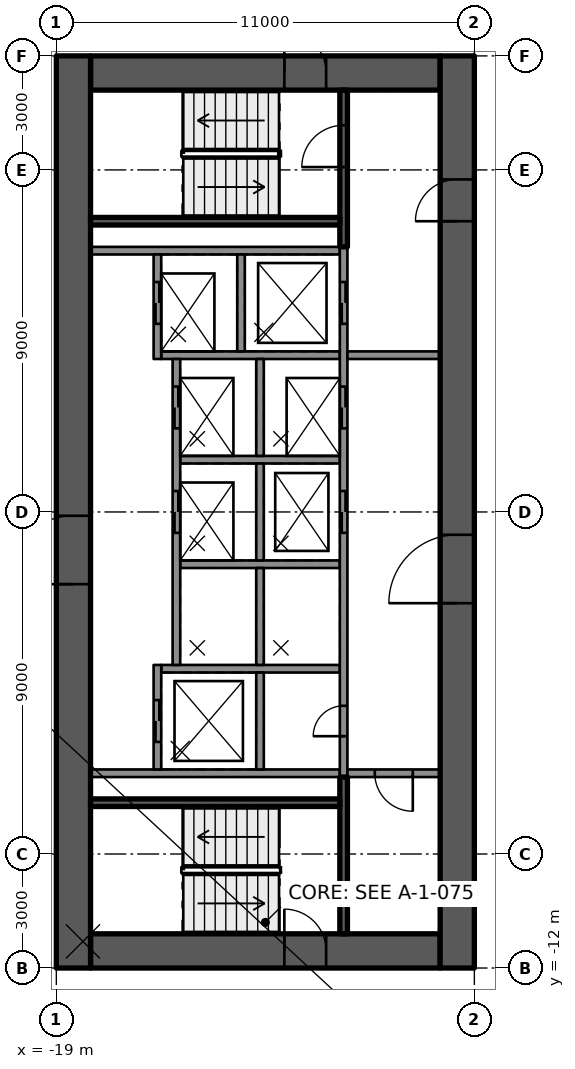
"""IFC4 building model, lengths in metres.
Left out: names, types, materials, properties, quantities, classifications, styles, units other than length and angle.
Written with IfcOpenShell. Run it as: python <this file> out.ifc"""

import sys

from ifc_helpers import new_model, si_unit, direction, frame, frame_2d, origin, place, context, subcontext, project, spatial, rectangle, extrude, element, fill, save


model = new_model("IFC4")
c1 = context("Model", 3, precision=1e-05, world=origin(), true_north=direction((0.0, 1.0)))
c2 = subcontext(c1, "Body", "Model", "MODEL_VIEW")
j1 = project(units=[si_unit("LENGTHUNIT", "METRE"), si_unit("PLANEANGLEUNIT", "RADIAN")], contexts=[c1])
p1 = place(None, origin())
s1 = spatial("IfcSite", under=j1, at=p1, CompositionType="ELEMENT")
p2 = place(p1, origin())
s2 = spatial("IfcBuilding", under=s1, at=p2, CompositionType="ELEMENT")
p3 = place(p2, frame((0.0, 0.0, 37.3)))
s3 = spatial("IfcBuildingStorey", under=s2, at=p3, CompositionType="ELEMENT", Elevation=37.3)
p4 = place(p3, frame((-18.1, 11.55, 0.0), z_axis=(0.0, 0.0, 1.0), x_axis=(1.0, 0.0, 0.0)))
e1 = element("IfcWall", 1, at=p4, inside=s3, PredefinedType="SHEAR", context=c2, shape_type="SweptSolid", body=[
    extrude(rectangle(XDim=9.2, YDim=0.9, at=frame_2d((4.6, 0.0))), origin(), (0.0, 0.0, 1.0), 3.5),
])
p5 = place(p4, frame((5.1, 0.0, 0.0)))
e2 = element("IfcOpeningElement", 2, at=p5, cuts=e1, PredefinedType="OPENING", context=c2, shape_type="SweptSolid", body=[
    extrude(rectangle(XDim=1.1, YDim=2.1, at=frame_2d((0.55, 1.05))), frame((0.0, 0.46, 0.0), z_axis=(0.0, -1.0, 0.0), x_axis=(1.0, 0.0, 0.0)), (0.0, 0.0, 1.0), 0.92),
])
p6 = place(p3, frame((-18.1, -11.55, 0.0), z_axis=(0.0, 0.0, 1.0), x_axis=(1.0, 0.0, 0.0)))
e3 = element("IfcWall", 3, at=p6, inside=s3, PredefinedType="SHEAR", context=c2, shape_type="SweptSolid", body=[
    extrude(rectangle(XDim=9.2, YDim=0.9, at=frame_2d((4.6, 0.0))), origin(), (0.0, 0.0, 1.0), 3.5),
])
p7 = place(p6, frame((5.1, 0.0, 0.0)))
e4 = element("IfcOpeningElement", 4, at=p7, cuts=e3, PredefinedType="OPENING", context=c2, shape_type="SweptSolid", body=[
    extrude(rectangle(XDim=1.1, YDim=2.1, at=frame_2d((0.55, 1.05))), frame((0.0, 0.46, 0.0), z_axis=(0.0, -1.0, 0.0), x_axis=(1.0, 0.0, 0.0)), (0.0, 0.0, 1.0), 0.92),
])
p8 = place(p3, frame((-18.55, -12.0, 0.0), z_axis=(0.0, 0.0, 1.0), x_axis=(0.0, 1.0, 0.0)))
e5 = element("IfcWall", 5, at=p8, inside=s3, PredefinedType="SHEAR", context=c2, shape_type="SweptSolid", body=[
    extrude(rectangle(XDim=24.0, YDim=0.9, at=frame_2d((12.0, 0.0))), origin(), (0.0, 0.0, 1.0), 3.5),
])
p9 = place(p8, frame((10.1, 0.0, 0.0)))
e6 = element("IfcOpeningElement", 6, at=p9, cuts=e5, PredefinedType="OPENING", context=c2, shape_type="SweptSolid", body=[
    extrude(rectangle(XDim=1.8, YDim=2.1, at=frame_2d((0.9, 1.05))), frame((0.0, 0.46, 0.0), z_axis=(0.0, -1.0, 0.0), x_axis=(1.0, 0.0, 0.0)), (0.0, 0.0, 1.0), 0.92),
])
p10 = place(p3, frame((-8.45, -12.0, 0.0), z_axis=(0.0, 0.0, 1.0), x_axis=(0.0, 1.0, 0.0)))
e7 = element("IfcWall", 7, at=p10, inside=s3, PredefinedType="SHEAR", context=c2, shape_type="SweptSolid", body=[
    extrude(rectangle(XDim=24.0, YDim=0.9, at=frame_2d((12.0, 0.0))), origin(), (0.0, 0.0, 1.0), 3.5),
])
p11 = place(p10, frame((9.6, 0.0, 0.0)))
e8 = element("IfcOpeningElement", 8, at=p11, cuts=e7, PredefinedType="OPENING", context=c2, shape_type="SweptSolid", body=[
    extrude(rectangle(XDim=1.8, YDim=2.1, at=frame_2d((0.9, 1.05))), frame((0.0, 0.46, 0.0), z_axis=(0.0, -1.0, 0.0), x_axis=(1.0, 0.0, 0.0)), (0.0, 0.0, 1.0), 0.92),
])
p12 = place(p10, frame((19.65, 0.0, 0.0)))
e9 = element("IfcOpeningElement", 9, at=p12, cuts=e7, PredefinedType="OPENING", context=c2, shape_type="SweptSolid", body=[
    extrude(rectangle(XDim=1.1, YDim=2.1, at=frame_2d((0.55, 1.05))), frame((0.0, 0.46, 0.0), z_axis=(0.0, -1.0, 0.0), x_axis=(1.0, 0.0, 0.0)), (0.0, 0.0, 1.0), 0.92),
])
for number, where, z_axis, x_axis in (
    (10, (-11.54, 6.875, 0.0), (0.0, 0.0, 1.0), (-1.0, 0.0, 0.0)),
    (11, (-11.54, -6.875, 0.0), (0.0, 0.0, 1.0), (-1.0, 0.0, 0.0)),
):
    element("IfcWall", number, at=place(p3, frame(where, z_axis=z_axis, x_axis=x_axis)), inside=s3, PredefinedType="SOLIDWALL", context=c2, shape_type="SweptSolid", body=[
        extrude(rectangle(XDim=6.56, YDim=0.2, at=frame_2d((3.28, 0.0))), origin(), (0.0, 0.0, 1.0), 3.08),
    ])
p13 = place(p3, frame((-11.54, -4.125, 0.0), z_axis=(0.0, 0.0, 1.0), x_axis=(-1.0, 0.0, 0.0)))
e12 = element("IfcWall", 12, at=p13, inside=s3, PredefinedType="SOLIDWALL", context=c2, shape_type="SweptSolid", body=[
    extrude(rectangle(XDim=4.7, YDim=0.2, at=frame_2d((2.35, 0.0))), origin(), (0.0, 0.0, 1.0), 3.08),
])
for number, where, z_axis, x_axis in (
    (13, (-11.54, -1.375, 0.0), (0.0, 0.0, 1.0), (-1.0, 0.0, 0.0)),
    (14, (-11.54, 1.375, 0.0), (0.0, 0.0, 1.0), (-1.0, 0.0, 0.0)),
):
    element("IfcWall", number, at=place(p3, frame(where, z_axis=z_axis, x_axis=x_axis)), inside=s3, PredefinedType="SOLIDWALL", context=c2, shape_type="SweptSolid", body=[
        extrude(rectangle(XDim=4.2, YDim=0.2, at=frame_2d((2.1, 0.0))), origin(), (0.0, 0.0, 1.0), 3.08),
    ])
p14 = place(p3, frame((-11.54, 4.125, 0.0), z_axis=(0.0, 0.0, 1.0), x_axis=(-1.0, 0.0, 0.0)))
e15 = element("IfcWall", 15, at=p14, inside=s3, PredefinedType="SOLIDWALL", context=c2, shape_type="SweptSolid", body=[
    extrude(rectangle(XDim=4.7, YDim=0.2, at=frame_2d((2.35, 0.0))), origin(), (0.0, 0.0, 1.0), 3.08),
])
p15 = place(p3, frame((-11.44, -6.975, 0.0), z_axis=(0.0, 0.0, 1.0), x_axis=(0.0, 1.0, 0.0)))
e16 = element("IfcWall", 16, at=p15, inside=s3, PredefinedType="SOLIDWALL", context=c2, shape_type="SweptSolid", body=[
    extrude(rectangle(XDim=13.95, YDim=0.2, at=frame_2d((6.975, 0.0))), origin(), (0.0, 0.0, 1.0), 3.08),
])
p16 = place(p15, frame((6.425, 0.0, 0.0)))
e17 = element("IfcOpeningElement", 17, at=p16, cuts=e16, PredefinedType="OPENING", context=c2, shape_type="SweptSolid", body=[
    extrude(rectangle(XDim=1.1, YDim=2.1, at=frame_2d((0.55, 1.05))), frame((0.0, 0.11, 0.0), z_axis=(0.0, -1.0, 0.0), x_axis=(1.0, 0.0, 0.0)), (0.0, 0.0, 1.0), 0.22),
])
p17 = place(p15, frame((9.175, 0.0, 0.0)))
e18 = element("IfcOpeningElement", 18, at=p17, cuts=e16, PredefinedType="OPENING", context=c2, shape_type="SweptSolid", body=[
    extrude(rectangle(XDim=1.1, YDim=2.1, at=frame_2d((0.55, 1.05))), frame((0.0, 0.11, 0.0), z_axis=(0.0, -1.0, 0.0), x_axis=(1.0, 0.0, 0.0)), (0.0, 0.0, 1.0), 0.22),
])
p18 = place(p15, frame((11.925, 0.0, 0.0)))
e19 = element("IfcOpeningElement", 19, at=p18, cuts=e16, PredefinedType="OPENING", context=c2, shape_type="SweptSolid", body=[
    extrude(rectangle(XDim=1.1, YDim=2.1, at=frame_2d((0.55, 1.05))), frame((0.0, 0.11, 0.0), z_axis=(0.0, -1.0, 0.0), x_axis=(1.0, 0.0, 0.0)), (0.0, 0.0, 1.0), 0.22),
])
p19 = place(p15, frame((1.075, 0.0, 0.0)))
e20 = element("IfcOpeningElement", 20, at=p19, cuts=e16, PredefinedType="OPENING", context=c2, shape_type="SweptSolid", body=[
    extrude(rectangle(XDim=0.8, YDim=2.1, at=frame_2d((0.4, 1.05))), frame((0.0, 0.11, 0.0), z_axis=(0.0, -1.0, 0.0), x_axis=(1.0, 0.0, 0.0)), (0.0, 0.0, 1.0), 0.22),
])
for number, where, z_axis, x_axis in (
    (21, (-13.64, -6.775, 0.0), (0.0, 0.0, 1.0), (0.0, 1.0, 0.0)),
    (22, (-13.64, -4.025, 0.0), (0.0, 0.0, 1.0), (0.0, 1.0, 0.0)),
    (23, (-13.64, -1.275, 0.0), (0.0, 0.0, 1.0), (0.0, 1.0, 0.0)),
    (24, (-13.64, 1.475, 0.0), (0.0, 0.0, 1.0), (0.0, 1.0, 0.0)),
    (25, (-14.14, 4.225, 0.0), (0.0, 0.0, 1.0), (0.0, 1.0, 0.0)),
):
    element("IfcWall", number, at=place(p3, frame(where, z_axis=z_axis, x_axis=x_axis)), inside=s3, PredefinedType="SOLIDWALL", context=c2, shape_type="SweptSolid", body=[
        extrude(rectangle(XDim=2.55, YDim=0.2, at=frame_2d((1.275, 0.0))), origin(), (0.0, 0.0, 1.0), 3.08),
    ])
p20 = place(p3, frame((-16.34, -6.775, 0.0), z_axis=(0.0, 0.0, 1.0), x_axis=(0.0, 1.0, 0.0)))
e26 = element("IfcWall", 26, at=p20, inside=s3, PredefinedType="SOLIDWALL", context=c2, shape_type="SweptSolid", body=[
    extrude(rectangle(XDim=2.75, YDim=0.2, at=frame_2d((1.375, 0.0))), origin(), (0.0, 0.0, 1.0), 3.08),
])
p21 = place(p20, frame((0.725, 0.0, 0.0)))
e27 = element("IfcOpeningElement", 27, at=p21, cuts=e26, PredefinedType="OPENING", context=c2, shape_type="SweptSolid", body=[
    extrude(rectangle(XDim=1.1, YDim=2.1, at=frame_2d((0.55, 1.05))), frame((0.0, 0.11, 0.0), z_axis=(0.0, -1.0, 0.0), x_axis=(1.0, 0.0, 0.0)), (0.0, 0.0, 1.0), 0.22),
])
p22 = place(p3, frame((-15.84, -4.025, 0.0), z_axis=(0.0, 0.0, 1.0), x_axis=(0.0, 1.0, 0.0)))
e28 = element("IfcWall", 28, at=p22, inside=s3, PredefinedType="SOLIDWALL", context=c2, shape_type="SweptSolid", body=[
    extrude(rectangle(XDim=8.05, YDim=0.2, at=frame_2d((4.025, 0.0))), origin(), (0.0, 0.0, 1.0), 3.08),
])
p23 = place(p22, frame((3.475, 0.0, 0.0)))
e29 = element("IfcOpeningElement", 29, at=p23, cuts=e28, PredefinedType="OPENING", context=c2, shape_type="SweptSolid", body=[
    extrude(rectangle(XDim=1.1, YDim=2.1, at=frame_2d((0.55, 1.05))), frame((0.0, 0.11, 0.0), z_axis=(0.0, -1.0, 0.0), x_axis=(1.0, 0.0, 0.0)), (0.0, 0.0, 1.0), 0.22),
])
p24 = place(p22, frame((6.225, 0.0, 0.0)))
e30 = element("IfcOpeningElement", 30, at=p24, cuts=e28, PredefinedType="OPENING", context=c2, shape_type="SweptSolid", body=[
    extrude(rectangle(XDim=1.1, YDim=2.1, at=frame_2d((0.55, 1.05))), frame((0.0, 0.11, 0.0), z_axis=(0.0, -1.0, 0.0), x_axis=(1.0, 0.0, 0.0)), (0.0, 0.0, 1.0), 0.22),
])
p25 = place(p3, frame((-16.34, 4.025, 0.0), z_axis=(0.0, 0.0, 1.0), x_axis=(0.0, 1.0, 0.0)))
e31 = element("IfcWall", 31, at=p25, inside=s3, PredefinedType="SOLIDWALL", context=c2, shape_type="SweptSolid", body=[
    extrude(rectangle(XDim=2.75, YDim=0.2, at=frame_2d((1.375, 0.0))), origin(), (0.0, 0.0, 1.0), 3.08),
])
p26 = place(p25, frame((0.925, 0.0, 0.0)))
e32 = element("IfcOpeningElement", 32, at=p26, cuts=e31, PredefinedType="OPENING", context=c2, shape_type="SweptSolid", body=[
    extrude(rectangle(XDim=1.1, YDim=2.1, at=frame_2d((0.55, 1.05))), frame((0.0, 0.11, 0.0), z_axis=(0.0, -1.0, 0.0), x_axis=(1.0, 0.0, 0.0)), (0.0, 0.0, 1.0), 0.22),
])
p27 = place(p3, frame((-11.44, 6.975, 0.0), z_axis=(0.0, 0.0, 1.0), x_axis=(0.0, 1.0, 0.0)))
e33 = element("IfcWall", 33, at=p27, inside=s3, PredefinedType="SOLIDWALL", context=c2, shape_type="SweptSolid", body=[
    extrude(rectangle(XDim=4.125, YDim=0.2, at=frame_2d((2.062, 0.0))), origin(), (0.0, 0.0, 1.0), 3.08),
])
p28 = place(p27, frame((2.1, 0.0, 0.0)))
e34 = element("IfcOpeningElement", 34, at=p28, cuts=e33, PredefinedType="OPENING", context=c2, shape_type="SweptSolid", body=[
    extrude(rectangle(XDim=1.1, YDim=2.1, at=frame_2d((0.55, 1.05))), frame((0.0, 0.11, 0.0), z_axis=(0.0, -1.0, 0.0), x_axis=(1.0, 0.0, 0.0)), (0.0, 0.0, 1.0), 0.22),
])
p29 = place(p3, frame((-11.54, 7.65, 0.0), z_axis=(0.0, 0.0, 1.0), x_axis=(-1.0, 0.0, 0.0)))
e35 = element("IfcWall", 35, at=p29, inside=s3, PredefinedType="SOLIDWALL", context=c2, shape_type="SweptSolid", body=[
    extrude(rectangle(XDim=6.56, YDim=0.2, at=frame_2d((3.28, 0.0))), origin(), (0.0, 0.0, 1.0), 3.08),
])
p30 = place(p3, frame((-11.44, -11.1, 0.0), z_axis=(0.0, 0.0, 1.0), x_axis=(0.0, 1.0, 0.0)))
e36 = element("IfcWall", 36, at=p30, inside=s3, PredefinedType="SOLIDWALL", context=c2, shape_type="SweptSolid", body=[
    extrude(rectangle(XDim=4.125, YDim=0.2, at=frame_2d((2.062, 0.0))), origin(), (0.0, 0.0, 1.0), 3.08),
])
p31 = place(p3, frame((-11.54, -7.65, 0.0), z_axis=(0.0, 0.0, 1.0), x_axis=(-1.0, 0.0, 0.0)))
e37 = element("IfcWall", 37, at=p31, inside=s3, PredefinedType="SOLIDWALL", context=c2, shape_type="SweptSolid", body=[
    extrude(rectangle(XDim=6.56, YDim=0.2, at=frame_2d((3.28, 0.0))), origin(), (0.0, 0.0, 1.0), 3.08),
])
p32 = place(p3, frame((-8.9, 4.125, 0.0), z_axis=(0.0, 0.0, 1.0), x_axis=(-1.0, 0.0, 0.0)))
e38 = element("IfcWall", 38, at=p32, inside=s3, PredefinedType="PARTITIONING", context=c2, shape_type="SweptSolid", body=[
    extrude(rectangle(XDim=2.44, YDim=0.2, at=frame_2d((1.22, 0.0))), origin(), (0.0, 0.0, 1.0), 3.08),
])
p33 = place(p3, frame((-8.9, -6.875, 0.0), z_axis=(0.0, 0.0, 1.0), x_axis=(-1.0, 0.0, 0.0)))
e39 = element("IfcWall", 39, at=p33, inside=s3, PredefinedType="PARTITIONING", context=c2, shape_type="SweptSolid", body=[
    extrude(rectangle(XDim=2.44, YDim=0.2, at=frame_2d((1.22, 0.0))), origin(), (0.0, 0.0, 1.0), 3.08),
])
p34 = place(p33, frame((0.72, 0.0, 0.0)))
e40 = element("IfcOpeningElement", 40, at=p34, cuts=e39, PredefinedType="OPENING", context=c2, shape_type="SweptSolid", body=[
    extrude(rectangle(XDim=1.0, YDim=2.1, at=frame_2d((0.5, 1.05))), frame((0.0, 0.11, 0.0), z_axis=(0.0, -1.0, 0.0), x_axis=(1.0, 0.0, 0.0)), (0.0, 0.0, 1.0), 0.22),
])
p35 = place(p21, origin())
e41 = element("IfcDoor", 41, at=p35, inside=s3, OperationType="DOUBLE_DOOR_SLIDING", PredefinedType="DOOR", context=c2, shape_type="SweptSolid", body=[
    extrude(rectangle(XDim=1.1, YDim=2.1, at=frame_2d((0.55, 1.05))), frame((0.0, 0.025, 0.0), z_axis=(0.0, -1.0, 0.0), x_axis=(1.0, 0.0, 0.0)), (0.0, 0.0, 1.0), 0.05),
])
fill(e27, e41)
p36 = place(p16, origin())
e42 = element("IfcDoor", 42, at=p36, inside=s3, OperationType="DOUBLE_DOOR_SLIDING", PredefinedType="DOOR", context=c2, shape_type="SweptSolid", body=[
    extrude(rectangle(XDim=1.1, YDim=2.1, at=frame_2d((0.55, 1.05))), frame((0.0, 0.025, 0.0), z_axis=(0.0, -1.0, 0.0), x_axis=(1.0, 0.0, 0.0)), (0.0, 0.0, 1.0), 0.05),
])
fill(e17, e42)
p37 = place(p23, origin())
e43 = element("IfcDoor", 43, at=p37, inside=s3, OperationType="DOUBLE_DOOR_SLIDING", PredefinedType="DOOR", context=c2, shape_type="SweptSolid", body=[
    extrude(rectangle(XDim=1.1, YDim=2.1, at=frame_2d((0.55, 1.05))), frame((0.0, 0.025, 0.0), z_axis=(0.0, -1.0, 0.0), x_axis=(1.0, 0.0, 0.0)), (0.0, 0.0, 1.0), 0.05),
])
fill(e29, e43)
p38 = place(p17, origin())
e44 = element("IfcDoor", 44, at=p38, inside=s3, OperationType="DOUBLE_DOOR_SLIDING", PredefinedType="DOOR", context=c2, shape_type="SweptSolid", body=[
    extrude(rectangle(XDim=1.1, YDim=2.1, at=frame_2d((0.55, 1.05))), frame((0.0, 0.025, 0.0), z_axis=(0.0, -1.0, 0.0), x_axis=(1.0, 0.0, 0.0)), (0.0, 0.0, 1.0), 0.05),
])
fill(e18, e44)
p39 = place(p24, origin())
e45 = element("IfcDoor", 45, at=p39, inside=s3, OperationType="DOUBLE_DOOR_SLIDING", PredefinedType="DOOR", context=c2, shape_type="SweptSolid", body=[
    extrude(rectangle(XDim=1.1, YDim=2.1, at=frame_2d((0.55, 1.05))), frame((0.0, 0.025, 0.0), z_axis=(0.0, -1.0, 0.0), x_axis=(1.0, 0.0, 0.0)), (0.0, 0.0, 1.0), 0.05),
])
fill(e30, e45)
p40 = place(p18, origin())
e46 = element("IfcDoor", 46, at=p40, inside=s3, OperationType="DOUBLE_DOOR_SLIDING", PredefinedType="DOOR", context=c2, shape_type="SweptSolid", body=[
    extrude(rectangle(XDim=1.1, YDim=2.1, at=frame_2d((0.55, 1.05))), frame((0.0, 0.025, 0.0), z_axis=(0.0, -1.0, 0.0), x_axis=(1.0, 0.0, 0.0)), (0.0, 0.0, 1.0), 0.05),
])
fill(e19, e46)
p41 = place(p26, origin())
e47 = element("IfcDoor", 47, at=p41, inside=s3, OperationType="DOUBLE_DOOR_SLIDING", PredefinedType="DOOR", context=c2, shape_type="SweptSolid", body=[
    extrude(rectangle(XDim=1.1, YDim=2.1, at=frame_2d((0.55, 1.05))), frame((0.0, 0.025, 0.0), z_axis=(0.0, -1.0, 0.0), x_axis=(1.0, 0.0, 0.0)), (0.0, 0.0, 1.0), 0.05),
])
fill(e32, e47)
p42 = place(p19, origin())
e48 = element("IfcDoor", 48, at=p42, inside=s3, OperationType="SINGLE_SWING_LEFT", PredefinedType="DOOR", context=c2, shape_type="SweptSolid", body=[
    extrude(rectangle(XDim=0.8, YDim=2.1, at=frame_2d((0.4, 1.05))), frame((0.0, 0.025, 0.0), z_axis=(0.0, -1.0, 0.0), x_axis=(1.0, 0.0, 0.0)), (0.0, 0.0, 1.0), 0.05),
])
fill(e20, e48)
p43 = place(p11, origin())
e49 = element("IfcDoor", 49, at=p43, inside=s3, OperationType="SINGLE_SWING_LEFT", PredefinedType="DOOR", context=c2, shape_type="SweptSolid", body=[
    extrude(rectangle(XDim=1.8, YDim=2.1, at=frame_2d((0.9, 1.05))), frame((0.0, 0.025, 0.0), z_axis=(0.0, -1.0, 0.0), x_axis=(1.0, 0.0, 0.0)), (0.0, 0.0, 1.0), 0.05),
])
fill(e8, e49)
p44 = place(p9, origin())
e50 = element("IfcDoor", 50, at=p44, inside=s3, OperationType="SINGLE_SWING_LEFT", PredefinedType="DOOR", context=c2, shape_type="SweptSolid", body=[
    extrude(rectangle(XDim=1.8, YDim=2.1, at=frame_2d((0.9, 1.05))), frame((0.0, 0.025, 0.0), z_axis=(0.0, -1.0, 0.0), x_axis=(1.0, 0.0, 0.0)), (0.0, 0.0, 1.0), 0.05),
])
fill(e6, e50)
p45 = place(p12, origin())
e51 = element("IfcDoor", 51, at=p45, inside=s3, OperationType="SINGLE_SWING_RIGHT", PredefinedType="DOOR", context=c2, shape_type="SweptSolid", body=[
    extrude(rectangle(XDim=1.1, YDim=2.1, at=frame_2d((0.55, 1.05))), frame((0.0, 0.025, 0.0), z_axis=(0.0, -1.0, 0.0), x_axis=(1.0, 0.0, 0.0)), (0.0, 0.0, 1.0), 0.05),
])
fill(e9, e51)
p46 = place(p5, origin())
e52 = element("IfcDoor", 52, at=p46, inside=s3, OperationType="SINGLE_SWING_RIGHT", PredefinedType="DOOR", context=c2, shape_type="SweptSolid", body=[
    extrude(rectangle(XDim=1.1, YDim=2.1, at=frame_2d((0.55, 1.05))), frame((0.0, 0.025, 0.0), z_axis=(0.0, -1.0, 0.0), x_axis=(1.0, 0.0, 0.0)), (0.0, 0.0, 1.0), 0.05),
])
fill(e2, e52)
p47 = place(p7, origin())
e53 = element("IfcDoor", 53, at=p47, inside=s3, OperationType="SINGLE_SWING_RIGHT", PredefinedType="DOOR", context=c2, shape_type="SweptSolid", body=[
    extrude(rectangle(XDim=1.1, YDim=2.1, at=frame_2d((0.55, 1.05))), frame((0.0, 0.025, 0.0), z_axis=(0.0, -1.0, 0.0), x_axis=(1.0, 0.0, 0.0)), (0.0, 0.0, 1.0), 0.05),
])
fill(e4, e53)
p48 = place(p28, origin())
e54 = element("IfcDoor", 54, at=p48, inside=s3, OperationType="SINGLE_SWING_RIGHT", PredefinedType="DOOR", context=c2, shape_type="SweptSolid", body=[
    extrude(rectangle(XDim=1.1, YDim=2.1, at=frame_2d((0.55, 1.05))), frame((0.0, 0.025, 0.0), z_axis=(0.0, -1.0, 0.0), x_axis=(1.0, 0.0, 0.0)), (0.0, 0.0, 1.0), 0.05),
])
fill(e34, e54)
p49 = place(p34, origin())
e55 = element("IfcDoor", 55, at=p49, inside=s3, OperationType="SINGLE_SWING_RIGHT", PredefinedType="DOOR", context=c2, shape_type="SweptSolid", body=[
    extrude(rectangle(XDim=1.0, YDim=2.1, at=frame_2d((0.5, 1.05))), frame((0.0, 0.025, 0.0), z_axis=(0.0, -1.0, 0.0), x_axis=(1.0, 0.0, 0.0)), (0.0, 0.0, 1.0), 0.05),
])
fill(e40, e55)
save(model, sys.argv[1])
